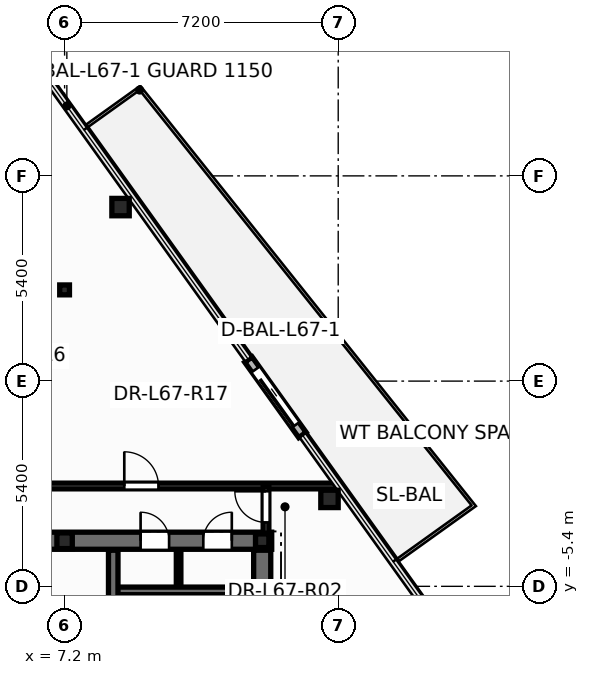
"""IFC4 building model, lengths in metres.
Left out: names, types, materials, properties, quantities, classifications, styles, units other than length and angle.
Written with IfcOpenShell. Run it as: python <this file> out.ifc"""

import sys

from ifc_helpers import new_model, si_unit, direction, frame, frame_2d, origin, origin_2d, place, context, subcontext, project, spatial, rectangle, hollow_circle, i_section, extrude, element, fill, save


model = new_model("IFC4")
c1 = context("Model", 3, precision=1e-05, world=origin(), true_north=direction((0.0, 1.0)))
c2 = subcontext(c1, "Body", "Model", "MODEL_VIEW")
j1 = project(units=[si_unit("LENGTHUNIT", "METRE"), si_unit("PLANEANGLEUNIT", "RADIAN")], contexts=[c1])
p1 = place(None, origin())
s1 = spatial("IfcSite", under=j1, at=p1, CompositionType="ELEMENT")
p2 = place(p1, origin())
s2 = spatial("IfcBuilding", under=s1, at=p2, CompositionType="ELEMENT")
p3 = place(p2, frame((0.0, 0.0, 256.2)))
s3 = spatial("IfcBuildingStorey", under=s2, at=p3, CompositionType="ELEMENT", Elevation=256.2)
for number, where, z_axis, x_axis in (
    (1, (14.171, -3.099, 0.0), (0.0, 0.0, 1.0), (1.0, 0.0, 0.0)),
    (2, (8.673, 4.579, 0.0), (0.0, 0.0, 1.0), (1.0, 0.0, 0.0)),
):
    element("IfcColumn", number, at=place(p3, frame(where, z_axis=z_axis, x_axis=x_axis)), inside=s3, PredefinedType="COLUMN", context=c2, shape_type="SweptSolid", body=[
        extrude(hollow_circle(Radius=0.229, WallThickness=0.016, at=origin_2d()), origin(), (0.0, 0.0, 1.0), 3.6),
    ])
p4 = place(p3, frame((12.4, -4.2, 0.0), z_axis=(0.0, 0.0, 1.0), x_axis=(1.0, 0.0, 0.0)))
e3 = element("IfcColumn", 3, at=p4, inside=s3, PredefinedType="COLUMN", context=c2, shape_type="SweptSolid", body=[
    extrude(i_section(OverallWidth=0.352, OverallDepth=0.359, WebThickness=0.018, FlangeThickness=0.026, at=origin_2d()), origin(), (0.0, 0.0, 1.0), 3.6),
])
p5 = place(p3, frame((7.2, -4.2, 0.0), z_axis=(0.0, 0.0, 1.0), x_axis=(1.0, 0.0, 0.0)))
e4 = element("IfcColumn", 4, at=p5, inside=s3, PredefinedType="PILASTER", context=c2, shape_type="SweptSolid", body=[
    extrude(i_section(OverallWidth=0.405, OverallDepth=0.414, WebThickness=0.022, FlangeThickness=0.032, at=origin_2d()), origin(), (0.0, 0.0, 1.0), 3.6),
])
p6 = place(p3, frame((7.2, 2.4, 0.0), z_axis=(0.0, 0.0, 1.0), x_axis=(1.0, 0.0, 0.0)))
e5 = element("IfcColumn", 5, at=p6, inside=s3, PredefinedType="COLUMN", context=c2, shape_type="SweptSolid", body=[
    extrude(i_section(OverallWidth=0.256, OverallDepth=0.26, WebThickness=0.01, FlangeThickness=0.017, at=origin_2d()), origin(), (0.0, 0.0, 1.0), 3.6),
])
p7 = place(p3, frame((13.458, -1.417, -0.015), z_axis=(0.0, 0.0, 1.0), x_axis=(-0.582146480264, 0.813083928949, 0.0)))
e6 = element("IfcWall", 6, at=p7, inside=s3, PredefinedType="STANDARD", context=c2, shape_type="SweptSolid", body=[
    extrude(rectangle(XDim=2.44, YDim=0.24, at=frame_2d((1.22, 0.0))), origin(), (0.0, 0.0, 1.0), 2.878),
])
p8 = place(p7, frame((0.32, 0.0, 0.015)))
e7 = element("IfcOpeningElement", 7, at=p8, cuts=e6, PredefinedType="OPENING", context=c2, shape_type="SweptSolid", body=[
    extrude(rectangle(XDim=1.806, YDim=2.204, at=frame_2d((0.9, 1.102))), frame((0.0, 0.13, 0.0), z_axis=(0.0, -1.0, 0.0), x_axis=(1.0, 0.0, 0.0)), (0.0, 0.0, 1.0), 0.26),
])
p9 = place(p3, frame((10.2, -5.52, 0.0), z_axis=(0.0, 0.0, 1.0), x_axis=(0.0, 1.0, 0.0)))
e8 = element("IfcWall", 8, at=p9, inside=s3, PredefinedType="PARTITIONING", context=c2, shape_type="SweptSolid", body=[
    extrude(rectangle(XDim=1.12, YDim=0.12, at=frame_2d((0.56, 0.0))), origin(), (0.0, 0.0, 1.0), 3.345),
])
p10 = place(p3, frame((-12.65, -4.2, 0.0), z_axis=(0.0, 0.0, 1.0), x_axis=(1.0, 0.0, 0.0)))
e9 = element("IfcWall", 9, at=p10, inside=s3, PredefinedType="SHEAR", context=c2, shape_type="SweptSolid", body=[
    extrude(rectangle(XDim=25.3, YDim=0.45, at=frame_2d((12.65, 0.0))), origin(), (0.0, 0.0, 1.0), 3.6),
])
p11 = place(p10, frame((1.85, 0.0, 0.0)))
e10 = element("IfcOpeningElement", 10, at=p11, cuts=e9, PredefinedType="OPENING", context=c2, shape_type="SweptSolid", body=[
    extrude(rectangle(XDim=0.756, YDim=2.054, at=frame_2d((0.375, 1.027))), frame((0.0, 0.235, 0.0), z_axis=(0.0, -1.0, 0.0), x_axis=(1.0, 0.0, 0.0)), (0.0, 0.0, 1.0), 0.47),
])
p12 = place(p10, frame((21.85, 0.0, 0.0)))
e11 = element("IfcOpeningElement", 11, at=p12, cuts=e9, PredefinedType="OPENING", context=c2, shape_type="SweptSolid", body=[
    extrude(rectangle(XDim=0.756, YDim=2.054, at=frame_2d((0.375, 1.027))), frame((0.0, 0.235, 0.0), z_axis=(0.0, -1.0, 0.0), x_axis=(1.0, 0.0, 0.0)), (0.0, 0.0, 1.0), 0.47),
])
p13 = place(p10, frame((23.5, 0.0, 0.0)))
e12 = element("IfcOpeningElement", 12, at=p13, cuts=e9, PredefinedType="OPENING", context=c2, shape_type="SweptSolid", body=[
    extrude(rectangle(XDim=0.756, YDim=2.054, at=frame_2d((0.375, 1.027))), frame((0.0, 0.235, 0.0), z_axis=(0.0, -1.0, 0.0), x_axis=(1.0, 0.0, 0.0)), (0.0, 0.0, 1.0), 0.47),
])
p14 = place(p10, frame((5.85, 0.0, 0.0)))
e13 = element("IfcOpeningElement", 13, at=p14, cuts=e9, PredefinedType="OPENING", context=c2, shape_type="SweptSolid", body=[
    extrude(rectangle(XDim=1.006, YDim=2.104, at=frame_2d((0.5, 1.052))), frame((0.0, 0.235, 0.0), z_axis=(0.0, -1.0, 0.0), x_axis=(1.0, 0.0, 0.0)), (0.0, 0.0, 1.0), 0.47),
])
p15 = place(p10, frame((10.35, 0.0, 0.0)))
e14 = element("IfcOpeningElement", 14, at=p15, cuts=e9, PredefinedType="OPENING", context=c2, shape_type="SweptSolid", body=[
    extrude(rectangle(XDim=1.406, YDim=2.154, at=frame_2d((0.7, 1.077))), frame((0.0, 0.235, 0.0), z_axis=(0.0, -1.0, 0.0), x_axis=(1.0, 0.0, 0.0)), (0.0, 0.0, 1.0), 0.47),
])
p16 = place(p10, frame((18.45, 0.0, 0.0)))
e15 = element("IfcOpeningElement", 15, at=p16, cuts=e9, PredefinedType="OPENING", context=c2, shape_type="SweptSolid", body=[
    extrude(rectangle(XDim=1.006, YDim=2.104, at=frame_2d((0.5, 1.052))), frame((0.0, 0.235, 0.0), z_axis=(0.0, -1.0, 0.0), x_axis=(1.0, 0.0, 0.0)), (0.0, 0.0, 1.0), 0.47),
])
p17 = place(p3, frame((8.48, -5.52, 0.0), z_axis=(0.0, 0.0, 1.0), x_axis=(1.0, 0.0, 0.0)))
e16 = element("IfcWall", 16, at=p17, inside=s3, PredefinedType="SOLIDWALL", context=c2, shape_type="SweptSolid", body=[
    extrude(rectangle(XDim=3.87, YDim=0.2, at=frame_2d((1.935, 0.0))), origin(), (0.0, 0.0, 1.0), 3.6),
])
p18 = place(p3, frame((11.9, -13.1, 0.0), z_axis=(0.0, 0.0, 1.0), x_axis=(0.0, 1.0, 0.0)))
e17 = element("IfcWall", 17, at=p18, inside=s3, PredefinedType="SOLIDWALL", context=c2, shape_type="SweptSolid", body=[
    extrude(rectangle(XDim=7.58, YDim=0.2, at=frame_2d((3.79, 0.0))), origin(), (0.0, 0.0, 1.0), 3.6),
])
p19 = place(p3, frame((8.48, -13.85, 0.0), z_axis=(0.0, 0.0, 1.0), x_axis=(0.0, 1.0, 0.0)))
e18 = element("IfcWall", 18, at=p19, inside=s3, PredefinedType="SHEAR", context=c2, shape_type="SweptSolid", body=[
    extrude(rectangle(XDim=9.4, YDim=0.25, at=frame_2d((4.7, 0.0))), origin(), (0.0, 0.0, 1.0), 3.6),
])
p20 = place(p19, frame((6.95, 0.0, 0.0)))
e19 = element("IfcOpeningElement", 19, at=p20, cuts=e18, PredefinedType="OPENING", context=c2, shape_type="SweptSolid", body=[
    extrude(rectangle(XDim=1.006, YDim=2.104, at=frame_2d((0.5, 1.052))), frame((0.0, 0.135, 0.0), z_axis=(0.0, -1.0, 0.0), x_axis=(1.0, 0.0, 0.0)), (0.0, 0.0, 1.0), 0.27),
])
p21 = place(p3, frame((12.4, -13.85, 0.0), z_axis=(0.0, 0.0, 1.0), x_axis=(0.0, 1.0, 0.0)))
e20 = element("IfcWall", 20, at=p21, inside=s3, PredefinedType="SHEAR", context=c2, shape_type="SweptSolid", body=[
    extrude(rectangle(XDim=9.4, YDim=0.45, at=frame_2d((4.7, 0.0))), origin(), (0.0, 0.0, 1.0), 3.6),
])
p22 = place(p3, frame((6.34, -2.76, 0.0), z_axis=(0.0, 0.0, 1.0), x_axis=(1.0, 0.0, 0.0)))
e21 = element("IfcWall", 21, at=p22, inside=s3, PredefinedType="PARTITIONING", context=c2, shape_type="SweptSolid", body=[
    extrude(rectangle(XDim=8.08, YDim=0.15, at=frame_2d((4.04, 0.0))), origin(), (0.0, 0.0, 1.0), 2.32),
])
p23 = place(p22, frame((2.431, 0.0, 0.0)))
e22 = element("IfcOpeningElement", 22, at=p23, cuts=e21, PredefinedType="OPENING", context=c2, shape_type="SweptSolid", body=[
    extrude(rectangle(XDim=0.906, YDim=2.104, at=frame_2d((0.45, 1.052))), frame((0.0, 0.085, 0.0), z_axis=(0.0, -1.0, 0.0), x_axis=(1.0, 0.0, 0.0)), (0.0, 0.0, 1.0), 0.17),
])
p24 = place(p3, frame((12.5, -4.24, 0.0), z_axis=(0.0, 0.0, 1.0), x_axis=(0.0, 1.0, 0.0)))
e23 = element("IfcWall", 23, at=p24, inside=s3, PredefinedType="PARTITIONING", context=c2, shape_type="SweptSolid", body=[
    extrude(rectangle(XDim=1.48, YDim=0.15, at=frame_2d((0.74, 0.0))), origin(), (0.0, 0.0, 1.0), 2.32),
])
p25 = place(p24, frame((0.522, 0.0, 0.0)))
e24 = element("IfcOpeningElement", 24, at=p25, cuts=e23, PredefinedType="OPENING", context=c2, shape_type="SweptSolid", body=[
    extrude(rectangle(XDim=0.826, YDim=2.104, at=frame_2d((0.41, 1.052))), frame((0.0, 0.085, 0.0), z_axis=(0.0, -1.0, 0.0), x_axis=(1.0, 0.0, 0.0)), (0.0, 0.0, 1.0), 0.17),
])
p26 = place(p8, origin())
e25 = element("IfcDoor", 25, at=p26, inside=s3, OperationType="SLIDING_TO_LEFT", PredefinedType="DOOR", context=c2, shape_type="SweptSolid", body=[
    extrude(rectangle(XDim=1.8, YDim=2.2, at=frame_2d((0.9, 1.1))), frame((0.0, 0.025, 0.0), z_axis=(0.0, -1.0, 0.0), x_axis=(1.0, 0.0, 0.0)), (0.0, 0.0, 1.0), 0.05),
])
fill(e7, e25)
p27 = place(p12, origin())
e26 = element("IfcDoor", 26, at=p27, inside=s3, OperationType="SINGLE_SWING_LEFT", PredefinedType="DOOR", context=c2, shape_type="SweptSolid", body=[
    extrude(rectangle(XDim=0.75, YDim=2.05, at=frame_2d((0.375, 1.025))), frame((0.0, 0.025, 0.0), z_axis=(0.0, -1.0, 0.0), x_axis=(1.0, 0.0, 0.0)), (0.0, 0.0, 1.0), 0.05),
])
fill(e11, e26)
p28 = place(p13, origin())
e27 = element("IfcDoor", 27, at=p28, inside=s3, OperationType="SINGLE_SWING_RIGHT", PredefinedType="DOOR", context=c2, shape_type="SweptSolid", body=[
    extrude(rectangle(XDim=0.75, YDim=2.05, at=frame_2d((0.375, 1.025))), frame((0.0, 0.025, 0.0), z_axis=(0.0, -1.0, 0.0), x_axis=(1.0, 0.0, 0.0)), (0.0, 0.0, 1.0), 0.05),
])
fill(e12, e27)
p29 = place(p25, origin())
e28 = element("IfcDoor", 28, at=p29, inside=s3, OperationType="SINGLE_SWING_RIGHT", PredefinedType="DOOR", context=c2, shape_type="SweptSolid", body=[
    extrude(rectangle(XDim=0.82, YDim=2.1, at=frame_2d((0.41, 1.05))), frame((0.0, 0.025, 0.0), z_axis=(0.0, -1.0, 0.0), x_axis=(1.0, 0.0, 0.0)), (0.0, 0.0, 1.0), 0.05),
])
fill(e24, e28)
p30 = place(p23, origin())
e29 = element("IfcDoor", 29, at=p30, inside=s3, OperationType="SINGLE_SWING_LEFT", PredefinedType="DOOR", context=c2, shape_type="SweptSolid", body=[
    extrude(rectangle(XDim=0.9, YDim=2.1, at=frame_2d((0.45, 1.05))), frame((0.0, 0.025, 0.0), z_axis=(0.0, -1.0, 0.0), x_axis=(1.0, 0.0, 0.0)), (0.0, 0.0, 1.0), 0.05),
])
fill(e22, e29)
save(model, sys.argv[1])
